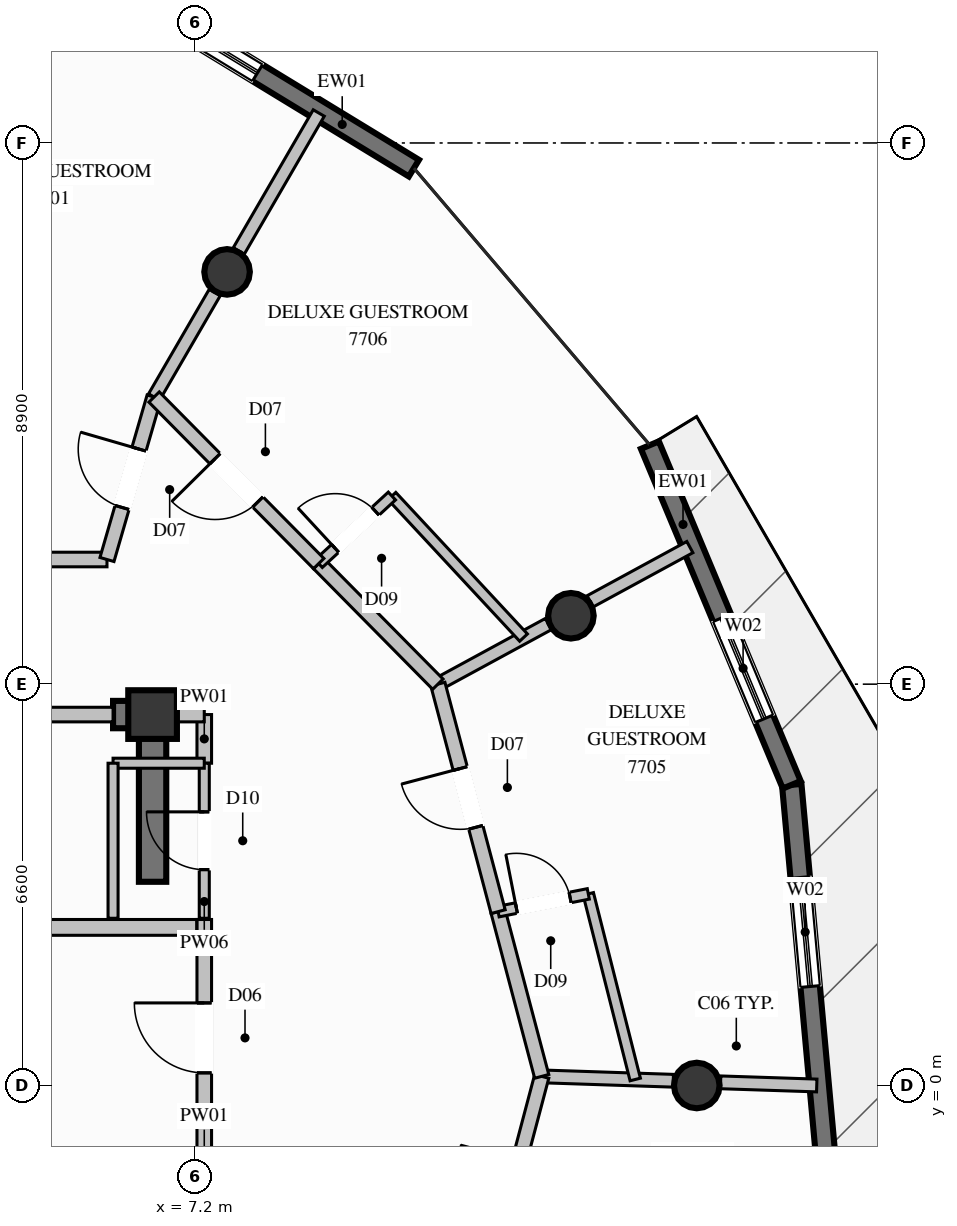
"""IFC4 building model, lengths in metres.
Left out: names, types, materials, properties, quantities, classifications, styles, units other than length and angle.
Written with IfcOpenShell. Run it as: python <this file> out.ifc"""

import sys

from ifc_helpers import new_model, si_unit, direction, frame, frame_2d, origin, origin_2d, place, context, subcontext, project, spatial, rectangle, circle, extrude, element, fill, save


model = new_model("IFC4")
c1 = context("Model", 3, precision=1e-05, world=origin(), true_north=direction((0.0, 1.0)))
c2 = subcontext(c1, "Body", "Model", "MODEL_VIEW")
j1 = project(units=[si_unit("LENGTHUNIT", "METRE"), si_unit("PLANEANGLEUNIT", "RADIAN")], contexts=[c1])
p1 = place(None, origin())
s1 = spatial("IfcSite", under=j1, at=p1, CompositionType="ELEMENT")
p2 = place(p1, origin())
s2 = spatial("IfcBuilding", under=s1, at=p2, CompositionType="ELEMENT")
p3 = place(p2, frame((0.0, 0.0, 289.6)))
s3 = spatial("IfcBuildingStorey", under=s2, at=p3, CompositionType="ELEMENT", Elevation=289.6)
p4 = place(p3, frame((6.5, 6.1, 0.0), z_axis=(0.0, 0.0, 1.0), x_axis=(1.0, 0.0, 0.0)))
e1 = element("IfcColumn", 1, at=p4, inside=s3, PredefinedType="COLUMN", context=c2, shape_type="SweptSolid", body=[
    extrude(rectangle(XDim=0.8, YDim=0.8, at=origin_2d()), origin(), (0.0, 0.0, 1.0), 3.8),
])
p5 = place(p3, frame((5.85, 6.1, 0.0), z_axis=(0.0, 0.0, 1.0), x_axis=(1.0, 0.0, 0.0)))
e2 = element("IfcWall", 2, at=p5, inside=s3, PredefinedType="SHEAR", context=c2, shape_type="SweptSolid", body=[
    extrude(rectangle(XDim=0.425, YDim=0.45, at=frame_2d((0.212, 0.0))), origin(), (0.0, 0.0, 1.0), 3.8),
])
p6 = place(p3, frame((6.5, 3.35, 0.0), z_axis=(0.0, 0.0, 1.0), x_axis=(0.0, 1.0, 0.0)))
e3 = element("IfcWall", 3, at=p6, inside=s3, PredefinedType="SHEAR", context=c2, shape_type="SweptSolid", body=[
    extrude(rectangle(XDim=2.975, YDim=0.45, at=frame_2d((1.487, 0.0))), origin(), (0.0, 0.0, 1.0), 3.8),
])
for number, where, z_axis, x_axis in (
    (4, (15.45, 0.0, 0.0), (0.0, 0.0, 1.0), (1.0, 0.0, 0.0)),
    (5, (13.38, 7.725, 0.0), (0.0, 0.0, 1.0), (1.0, 0.0, 0.0)),
    (6, (7.725, 13.38, 0.0), (0.0, 0.0, 1.0), (1.0, 0.0, 0.0)),
):
    element("IfcColumn", number, at=place(p3, frame(where, z_axis=z_axis, x_axis=x_axis)), inside=s3, PredefinedType="COLUMN", context=c2, shape_type="SweptSolid", body=[
        extrude(circle(Radius=0.375, at=origin_2d()), origin(), (0.0, 0.0, 1.0), 3.8),
    ])
p7 = place(p3, frame((17.012, 4.945, 0.0), z_axis=(0.0, 0.0, 1.0), x_axis=(0.090882437135, -0.99586162825, 0.0)))
e7 = element("IfcWall", 7, at=p7, inside=s3, PredefinedType="SOLIDWALL", context=c2, shape_type="SweptSolid", body=[
    extrude(rectangle(XDim=6.095, YDim=0.32, at=frame_2d((3.048, 0.0))), origin(), (0.0, 0.0, 1.0), 3.57),
])
p8 = place(p7, frame((1.531, 0.0, 0.35)))
e8 = element("IfcOpeningElement", 8, at=p8, cuts=e7, PredefinedType="OPENING", context=c2, shape_type="SweptSolid", body=[
    extrude(rectangle(XDim=1.8, YDim=2.6, at=frame_2d((0.9, 1.3))), frame((0.0, 0.17, 0.0), z_axis=(0.0, -1.0, 0.0), x_axis=(1.0, 0.0, 0.0)), (0.0, 0.0, 1.0), 0.34),
])
p9 = place(p3, frame((14.679, 10.531, 0.0), z_axis=(0.0, 0.0, 1.0), x_axis=(0.385394166941, -0.922752044749, 0.0)))
e9 = element("IfcWall", 9, at=p9, inside=s3, PredefinedType="SOLIDWALL", context=c2, shape_type="SweptSolid", body=[
    extrude(rectangle(XDim=6.053, YDim=0.32, at=frame_2d((3.027, 0.0))), origin(), (0.0, 0.0, 1.0), 3.57),
])
p10 = place(p9, frame((3.077, 0.0, 0.35)))
e10 = element("IfcOpeningElement", 10, at=p10, cuts=e9, PredefinedType="OPENING", context=c2, shape_type="SweptSolid", body=[
    extrude(rectangle(XDim=1.8, YDim=2.6, at=frame_2d((0.9, 1.3))), frame((0.0, 0.17, 0.0), z_axis=(0.0, -1.0, 0.0), x_axis=(1.0, 0.0, 0.0)), (0.0, 0.0, 1.0), 0.34),
])
p11 = place(p3, frame((5.746, 18.165, 0.0), z_axis=(0.0, 0.0, 1.0), x_axis=(0.853900395315, -0.520436465748, 0.0)))
e11 = element("IfcWall", 11, at=p11, inside=s3, PredefinedType="SOLIDWALL", context=c2, shape_type="SweptSolid", body=[
    extrude(rectangle(XDim=5.917, YDim=0.32, at=frame_2d((2.958, 0.0))), origin(), (0.0, 0.0, 1.0), 3.57),
])
p12 = place(p11, frame((1.104, 0.0, 0.35)))
e12 = element("IfcOpeningElement", 12, at=p12, cuts=e11, PredefinedType="OPENING", context=c2, shape_type="SweptSolid", body=[
    extrude(rectangle(XDim=1.8, YDim=2.6, at=frame_2d((0.9, 1.3))), frame((0.0, 0.17, 0.0), z_axis=(0.0, -1.0, 0.0), x_axis=(1.0, 0.0, 0.0)), (0.0, 0.0, 1.0), 0.34),
])
p13 = place(p3, frame((7.35, -2.34, 0.0), z_axis=(0.0, 0.0, 1.0), x_axis=(0.0, 1.0, 0.0)))
e13 = element("IfcWall", 13, at=p13, inside=s3, PredefinedType="PARTITIONING", context=c2, shape_type="SweptSolid", body=[
    extrude(rectangle(XDim=5.07, YDim=0.24, at=frame_2d((2.535, 0.0))), origin(), (0.0, 0.0, 1.0), 2.655),
])
p14 = place(p13, frame((2.548, 0.0, 0.0)))
e14 = element("IfcOpeningElement", 14, at=p14, cuts=e13, PredefinedType="OPENING", context=c2, shape_type="SweptSolid", body=[
    extrude(rectangle(XDim=1.15, YDim=2.2, at=frame_2d((0.575, 1.1))), frame((0.0, 0.13, 0.0), z_axis=(0.0, -1.0, 0.0), x_axis=(1.0, 0.0, 0.0)), (0.0, 0.0, 1.0), 0.26),
])
p15 = place(p3, frame((4.13, 2.6, 0.0), z_axis=(0.0, 0.0, 1.0), x_axis=(1.0, 0.0, 0.0)))
e15 = element("IfcWall", 15, at=p15, inside=s3, PredefinedType="PARTITIONING", context=c2, shape_type="SweptSolid", body=[
    extrude(rectangle(XDim=3.095, YDim=0.26, at=frame_2d((1.548, 0.0))), origin(), (0.0, 0.0, 1.0), 3.57),
])
p16 = place(p3, frame((-5.75, 8.65, 0.0), z_axis=(0.0, 0.0, 1.0), x_axis=(1.0, 0.0, 0.0)))
e16 = element("IfcWall", 16, at=p16, inside=s3, PredefinedType="PARTITIONING", context=c2, shape_type="SweptSolid", body=[
    extrude(rectangle(XDim=11.5, YDim=0.24, at=frame_2d((5.75, 0.0))), origin(), (0.0, 0.0, 1.0), 3.57),
])
p17 = place(p3, frame((3.0, 6.1, 0.0), z_axis=(0.0, 0.0, 1.0), x_axis=(1.0, 0.0, 0.0)))
e17 = element("IfcWall", 17, at=p17, inside=s3, PredefinedType="PARTITIONING", context=c2, shape_type="SweptSolid", body=[
    extrude(rectangle(XDim=2.85, YDim=0.24, at=frame_2d((1.425, 0.0))), origin(), (0.0, 0.0, 1.0), 2.655),
])
p18 = place(p3, frame((7.35, 5.3, 0.0), z_axis=(0.0, 0.0, 1.0), x_axis=(0.0, 1.0, 0.0)))
e18 = element("IfcWall", 18, at=p18, inside=s3, PredefinedType="PARTITIONING", context=c2, shape_type="SweptSolid", body=[
    extrude(rectangle(XDim=0.8, YDim=0.24, at=frame_2d((0.4, 0.0))), origin(), (0.0, 0.0, 1.0), 2.655),
])
p19 = place(p3, frame((6.5, 6.1, 0.0), z_axis=(0.0, 0.0, 1.0), x_axis=(1.0, 0.0, 0.0)))
e19 = element("IfcWall", 19, at=p19, inside=s3, PredefinedType="PARTITIONING", context=c2, shape_type="SweptSolid", body=[
    extrude(rectangle(XDim=0.85, YDim=0.24, at=frame_2d((0.425, 0.0))), origin(), (0.0, 0.0, 1.0), 3.085),
])
p20 = place(p3, frame((7.35, 2.75, 0.0), z_axis=(0.0, 0.0, 1.0), x_axis=(0.0, 1.0, 0.0)))
e20 = element("IfcWall", 20, at=p20, inside=s3, PredefinedType="PARTITIONING", context=c2, shape_type="SweptSolid", body=[
    extrude(rectangle(XDim=2.55, YDim=0.165, at=frame_2d((1.275, 0.0))), origin(), (0.0, 0.0, 1.0), 3.57),
])
p21 = place(p20, frame((0.8, 0.0, 0.0)))
e21 = element("IfcOpeningElement", 21, at=p21, cuts=e20, PredefinedType="OPENING", context=c2, shape_type="SweptSolid", body=[
    extrude(rectangle(XDim=0.95, YDim=2.1, at=frame_2d((0.475, 1.05))), frame((0.0, 0.093, 0.0), z_axis=(0.0, -1.0, 0.0), x_axis=(1.0, 0.0, 0.0)), (0.0, 0.0, 1.0), 0.185),
])
p22 = place(p3, frame((7.35, 5.3, 0.0), z_axis=(0.0, 0.0, 1.0), x_axis=(-1.0, 0.0, 0.0)))
e22 = element("IfcWall", 22, at=p22, inside=s3, PredefinedType="PARTITIONING", context=c2, shape_type="SweptSolid", body=[
    extrude(rectangle(XDim=1.5, YDim=0.165, at=frame_2d((0.75, 0.0))), origin(), (0.0, 0.0, 1.0), 2.655),
])
p23 = place(p3, frame((5.85, 5.3, 0.0), z_axis=(0.0, 0.0, 1.0), x_axis=(0.0, -1.0, 0.0)))
e23 = element("IfcWall", 23, at=p23, inside=s3, PredefinedType="PARTITIONING", context=c2, shape_type="SweptSolid", body=[
    extrude(rectangle(XDim=2.55, YDim=0.165, at=frame_2d((1.275, 0.0))), origin(), (0.0, 0.0, 1.0), 2.655),
])
p24 = place(p3, frame((12.9, 0.15, 0.0), z_axis=(0.0, 0.0, 1.0), x_axis=(0.999446158263, -0.033277270507, 0.0)))
e24 = element("IfcWall", 24, at=p24, inside=s3, PredefinedType="PARTITIONING", context=c2, shape_type="SweptSolid", body=[
    extrude(rectangle(XDim=2.164, YDim=0.21, at=frame_2d((1.082, 0.0))), origin(), (0.0, 0.0, 1.0), 3.57),
])
p25 = place(p3, frame((15.842, 0.052, 0.0), z_axis=(0.0, 0.0, 1.0), x_axis=(0.999459540267, -0.032872897171, 0.0)))
e25 = element("IfcWall", 25, at=p25, inside=s3, PredefinedType="PARTITIONING", context=c2, shape_type="SweptSolid", body=[
    extrude(rectangle(XDim=1.582, YDim=0.21, at=frame_2d((0.791, 0.0))), origin(), (0.0, 0.0, 1.0), 3.57),
])
p26 = place(p3, frame((11.192, 6.6, 0.0), z_axis=(0.0, 0.0, 1.0), x_axis=(0.878580364195, 0.477594538967, 0.0)))
e26 = element("IfcWall", 26, at=p26, inside=s3, PredefinedType="PARTITIONING", context=c2, shape_type="SweptSolid", body=[
    extrude(rectangle(XDim=2.068, YDim=0.21, at=frame_2d((1.034, 0.0))), origin(), (0.0, 0.0, 1.0), 3.085),
])
p27 = place(p3, frame((13.696, 7.962, 0.0), z_axis=(0.0, 0.0, 1.0), x_axis=(0.878434786157, 0.477862246333, 0.0)))
e27 = element("IfcWall", 27, at=p27, inside=s3, PredefinedType="PARTITIONING", context=c2, shape_type="SweptSolid", body=[
    extrude(rectangle(XDim=1.867, YDim=0.21, at=frame_2d((0.934, 0.0))), origin(), (0.0, 0.0, 1.0), 3.57),
])
p28 = place(p3, frame((6.525, 11.322, 0.0), z_axis=(0.0, 0.0, 1.0), x_axis=(0.501738314133, 0.865019458817, 0.0)))
e28 = element("IfcWall", 28, at=p28, inside=s3, PredefinedType="PARTITIONING", context=c2, shape_type="SweptSolid", body=[
    extrude(rectangle(XDim=1.987, YDim=0.21, at=frame_2d((0.994, 0.0))), origin(), (0.0, 0.0, 1.0), 3.085),
])
p29 = place(p3, frame((7.918, 13.725, 0.0), z_axis=(0.0, 0.0, 1.0), x_axis=(0.501605190626, 0.865096660921, 0.0)))
e29 = element("IfcWall", 29, at=p29, inside=s3, PredefinedType="PARTITIONING", context=c2, shape_type="SweptSolid", body=[
    extrude(rectangle(XDim=2.622, YDim=0.21, at=frame_2d((1.311, 0.0))), origin(), (0.0, 0.0, 1.0), 3.57),
])
p30 = place(p3, frame((5.75, 8.65, 0.0), z_axis=(0.0, 0.0, 1.0), x_axis=(0.27852040308, 0.960430312448, 0.0)))
e30 = element("IfcWall", 30, at=p30, inside=s3, PredefinedType="PARTITIONING", context=c2, shape_type="SweptSolid", body=[
    extrude(rectangle(XDim=2.782, YDim=0.24, at=frame_2d((1.391, 0.0))), origin(), (0.0, 0.0, 1.0), 3.57),
])
p31 = place(p30, frame((0.891, 0.0, 0.0)))
e31 = element("IfcOpeningElement", 31, at=p31, cuts=e30, PredefinedType="OPENING", context=c2, shape_type="SweptSolid", body=[
    extrude(rectangle(XDim=1.0, YDim=2.2, at=frame_2d((0.5, 1.1))), frame((0.0, 0.13, 0.0), z_axis=(0.0, -1.0, 0.0), x_axis=(1.0, 0.0, 0.0)), (0.0, 0.0, 1.0), 0.26),
])
p32 = place(p3, frame((11.909, -3.591, 0.0), z_axis=(0.0, 0.0, 1.0), x_axis=(0.256064218317, 0.96665977267, 0.0)))
e32 = element("IfcWall", 32, at=p32, inside=s3, PredefinedType="PARTITIONING", context=c2, shape_type="SweptSolid", body=[
    extrude(rectangle(XDim=3.87, YDim=0.24, at=frame_2d((1.935, 0.0))), origin(), (0.0, 0.0, 1.0), 3.57),
])
p33 = place(p32, frame((1.435, 0.0, 0.0)))
e33 = element("IfcOpeningElement", 33, at=p33, cuts=e32, PredefinedType="OPENING", context=c2, shape_type="SweptSolid", body=[
    extrude(rectangle(XDim=1.0, YDim=2.2, at=frame_2d((0.5, 1.1))), frame((0.0, 0.13, 0.0), z_axis=(0.0, -1.0, 0.0), x_axis=(1.0, 0.0, 0.0)), (0.0, 0.0, 1.0), 0.26),
])
p34 = place(p3, frame((12.9, 0.15, 0.0), z_axis=(0.0, 0.0, 1.0), x_axis=(-0.255796771697, 0.966730578594, 0.0)))
e34 = element("IfcWall", 34, at=p34, inside=s3, PredefinedType="PARTITIONING", context=c2, shape_type="SweptSolid", body=[
    extrude(rectangle(XDim=2.802, YDim=0.24, at=frame_2d((1.401, 0.0))), origin(), (0.0, 0.0, 1.0), 3.57),
])
p35 = place(p3, frame((14.438, 0.099, 0.0), z_axis=(0.0, 0.0, 1.0), x_axis=(-0.245235496537, 0.969463537859, 0.0)))
e35 = element("IfcWall", 35, at=p35, inside=s3, PredefinedType="PLUMBINGWALL", context=c2, shape_type="SweptSolid", body=[
    extrude(rectangle(XDim=3.148, YDim=0.175, at=frame_2d((1.574, 0.0))), origin(), (0.0, 0.0, 1.0), 3.57),
])
p36 = place(p3, frame((12.183, 2.859, 0.0), z_axis=(0.0, 0.0, 1.0), x_axis=(0.981160337134, 0.193195219495, 0.0)))
e36 = element("IfcWall", 36, at=p36, inside=s3, PredefinedType="PLUMBINGWALL", context=c2, shape_type="SweptSolid", body=[
    extrude(rectangle(XDim=1.511, YDim=0.175, at=frame_2d((0.756, 0.0))), origin(), (0.0, 0.0, 1.0), 3.57),
])
p37 = place(p36, frame((0.306, 0.0, 0.0)))
e37 = element("IfcOpeningElement", 37, at=p37, cuts=e36, PredefinedType="OPENING", context=c2, shape_type="SweptSolid", body=[
    extrude(rectangle(XDim=0.9, YDim=2.1, at=frame_2d((0.45, 1.05))), frame((0.0, 0.098, 0.0), z_axis=(0.0, -1.0, 0.0), x_axis=(1.0, 0.0, 0.0)), (0.0, 0.0, 1.0), 0.195),
])
p38 = place(p3, frame((12.183, 2.859, 0.0), z_axis=(0.0, 0.0, 1.0), x_axis=(-0.256107548437, 0.966648293659, 0.0)))
e38 = element("IfcWall", 38, at=p38, inside=s3, PredefinedType="PARTITIONING", context=c2, shape_type="SweptSolid", body=[
    extrude(rectangle(XDim=3.87, YDim=0.24, at=frame_2d((1.935, 0.0))), origin(), (0.0, 0.0, 1.0), 3.57),
])
p39 = place(p38, frame((1.435, 0.0, 0.0)))
e39 = element("IfcOpeningElement", 39, at=p39, cuts=e38, PredefinedType="OPENING", context=c2, shape_type="SweptSolid", body=[
    extrude(rectangle(XDim=1.0, YDim=2.2, at=frame_2d((0.5, 1.1))), frame((0.0, 0.13, 0.0), z_axis=(0.0, -1.0, 0.0), x_axis=(1.0, 0.0, 0.0)), (0.0, 0.0, 1.0), 0.26),
])
p40 = place(p3, frame((11.192, 6.6, 0.0), z_axis=(0.0, 0.0, 1.0), x_axis=(-0.702979205765, 0.711210402245, 0.0)))
e40 = element("IfcWall", 40, at=p40, inside=s3, PredefinedType="PARTITIONING", context=c2, shape_type="SweptSolid", body=[
    extrude(rectangle(XDim=2.788, YDim=0.24, at=frame_2d((1.394, 0.0))), origin(), (0.0, 0.0, 1.0), 3.57),
])
p41 = place(p3, frame((12.601, 7.366, 0.0), z_axis=(0.0, 0.0, 1.0), x_axis=(-0.680992876569, 0.732290039576, 0.0)))
e41 = element("IfcWall", 41, at=p41, inside=s3, PredefinedType="PLUMBINGWALL", context=c2, shape_type="SweptSolid", body=[
    extrude(rectangle(XDim=3.179, YDim=0.175, at=frame_2d((1.59, 0.0))), origin(), (0.0, 0.0, 1.0), 3.57),
])
p42 = place(p3, frame((9.232, 8.583, 0.0), z_axis=(0.0, 0.0, 1.0), x_axis=(0.734923403839, 0.678150123859, 0.0)))
e42 = element("IfcWall", 42, at=p42, inside=s3, PredefinedType="PLUMBINGWALL", context=c2, shape_type="SweptSolid", body=[
    extrude(rectangle(XDim=1.638, YDim=0.175, at=frame_2d((0.819, 0.0))), origin(), (0.0, 0.0, 1.0), 3.57),
])
p43 = place(p42, frame((0.369, 0.0, 0.0)))
e43 = element("IfcOpeningElement", 43, at=p43, cuts=e42, PredefinedType="OPENING", context=c2, shape_type="SweptSolid", body=[
    extrude(rectangle(XDim=0.9, YDim=2.1, at=frame_2d((0.45, 1.05))), frame((0.0, 0.098, 0.0), z_axis=(0.0, -1.0, 0.0), x_axis=(1.0, 0.0, 0.0)), (0.0, 0.0, 1.0), 0.195),
])
p44 = place(p3, frame((9.232, 8.583, 0.0), z_axis=(0.0, 0.0, 1.0), x_axis=(-0.702942107486, 0.711247069254, 0.0)))
e44 = element("IfcWall", 44, at=p44, inside=s3, PredefinedType="PARTITIONING", context=c2, shape_type="SweptSolid", body=[
    extrude(rectangle(XDim=3.851, YDim=0.24, at=frame_2d((1.926, 0.0))), origin(), (0.0, 0.0, 1.0), 3.57),
])
p45 = place(p44, frame((1.425, 0.0, 0.0)))
e45 = element("IfcOpeningElement", 45, at=p45, cuts=e44, PredefinedType="OPENING", context=c2, shape_type="SweptSolid", body=[
    extrude(rectangle(XDim=1.0, YDim=2.2, at=frame_2d((0.5, 1.1))), frame((0.0, 0.13, 0.0), z_axis=(0.0, -1.0, 0.0), x_axis=(1.0, 0.0, 0.0)), (0.0, 0.0, 1.0), 0.26),
])
p46 = place(p8, origin())
e46 = element("IfcWindow", 46, at=p46, inside=s3, PartitioningType="SINGLE_PANEL", PredefinedType="WINDOW", context=c2, shape_type="SweptSolid", body=[
    extrude(rectangle(XDim=1.8, YDim=2.6, at=frame_2d((0.9, 1.3))), frame((0.0, 0.03, 0.0), z_axis=(0.0, -1.0, 0.0), x_axis=(1.0, 0.0, 0.0)), (0.0, 0.0, 1.0), 0.06),
])
fill(e8, e46)
p47 = place(p10, origin())
e47 = element("IfcWindow", 47, at=p47, inside=s3, PartitioningType="SINGLE_PANEL", PredefinedType="WINDOW", context=c2, shape_type="SweptSolid", body=[
    extrude(rectangle(XDim=1.8, YDim=2.6, at=frame_2d((0.9, 1.3))), frame((0.0, 0.03, 0.0), z_axis=(0.0, -1.0, 0.0), x_axis=(1.0, 0.0, 0.0)), (0.0, 0.0, 1.0), 0.06),
])
fill(e10, e47)
p48 = place(p12, origin())
e48 = element("IfcWindow", 48, at=p48, inside=s3, PartitioningType="SINGLE_PANEL", PredefinedType="WINDOW", context=c2, shape_type="SweptSolid", body=[
    extrude(rectangle(XDim=1.8, YDim=2.6, at=frame_2d((0.9, 1.3))), frame((0.0, 0.03, 0.0), z_axis=(0.0, -1.0, 0.0), x_axis=(1.0, 0.0, 0.0)), (0.0, 0.0, 1.0), 0.06),
])
fill(e12, e48)
p49 = place(p14, origin())
e49 = element("IfcDoor", 49, at=p49, inside=s3, OperationType="SINGLE_SWING_RIGHT", PredefinedType="DOOR", context=c2, shape_type="SweptSolid", body=[
    extrude(rectangle(XDim=1.15, YDim=2.2, at=frame_2d((0.575, 1.1))), frame((0.0, 0.025, 0.0), z_axis=(0.0, -1.0, 0.0), x_axis=(1.0, 0.0, 0.0)), (0.0, 0.0, 1.0), 0.05),
])
fill(e14, e49)
p50 = place(p21, origin())
e50 = element("IfcDoor", 50, at=p50, inside=s3, OperationType="SINGLE_SWING_RIGHT", PredefinedType="DOOR", context=c2, shape_type="SweptSolid", body=[
    extrude(rectangle(XDim=0.95, YDim=2.1, at=frame_2d((0.475, 1.05))), frame((0.0, 0.025, 0.0), z_axis=(0.0, -1.0, 0.0), x_axis=(1.0, 0.0, 0.0)), (0.0, 0.0, 1.0), 0.05),
])
fill(e21, e50)
p51 = place(p31, origin())
e51 = element("IfcDoor", 51, at=p51, inside=s3, OperationType="SINGLE_SWING_RIGHT", PredefinedType="DOOR", context=c2, shape_type="SweptSolid", body=[
    extrude(rectangle(XDim=1.0, YDim=2.2, at=frame_2d((0.5, 1.1))), frame((0.0, 0.025, 0.0), z_axis=(0.0, -1.0, 0.0), x_axis=(1.0, 0.0, 0.0)), (0.0, 0.0, 1.0), 0.05),
])
fill(e31, e51)
p52 = place(p37, origin())
e52 = element("IfcDoor", 52, at=p52, inside=s3, OperationType="SINGLE_SWING_LEFT", PredefinedType="DOOR", context=c2, shape_type="SweptSolid", body=[
    extrude(rectangle(XDim=0.9, YDim=2.1, at=frame_2d((0.45, 1.05))), frame((0.0, 0.025, 0.0), z_axis=(0.0, -1.0, 0.0), x_axis=(1.0, 0.0, 0.0)), (0.0, 0.0, 1.0), 0.05),
])
fill(e37, e52)
p53 = place(p39, origin())
e53 = element("IfcDoor", 53, at=p53, inside=s3, OperationType="SINGLE_SWING_RIGHT", PredefinedType="DOOR", context=c2, shape_type="SweptSolid", body=[
    extrude(rectangle(XDim=1.0, YDim=2.2, at=frame_2d((0.5, 1.1))), frame((0.0, 0.025, 0.0), z_axis=(0.0, -1.0, 0.0), x_axis=(1.0, 0.0, 0.0)), (0.0, 0.0, 1.0), 0.05),
])
fill(e39, e53)
p54 = place(p43, origin())
e54 = element("IfcDoor", 54, at=p54, inside=s3, OperationType="SINGLE_SWING_LEFT", PredefinedType="DOOR", context=c2, shape_type="SweptSolid", body=[
    extrude(rectangle(XDim=0.9, YDim=2.1, at=frame_2d((0.45, 1.05))), frame((0.0, 0.025, 0.0), z_axis=(0.0, -1.0, 0.0), x_axis=(1.0, 0.0, 0.0)), (0.0, 0.0, 1.0), 0.05),
])
fill(e43, e54)
p55 = place(p45, origin())
e55 = element("IfcDoor", 55, at=p55, inside=s3, OperationType="SINGLE_SWING_RIGHT", PredefinedType="DOOR", context=c2, shape_type="SweptSolid", body=[
    extrude(rectangle(XDim=1.0, YDim=2.2, at=frame_2d((0.5, 1.1))), frame((0.0, 0.025, 0.0), z_axis=(0.0, -1.0, 0.0), x_axis=(1.0, 0.0, 0.0)), (0.0, 0.0, 1.0), 0.05),
])
fill(e45, e55)
save(model, sys.argv[1])
